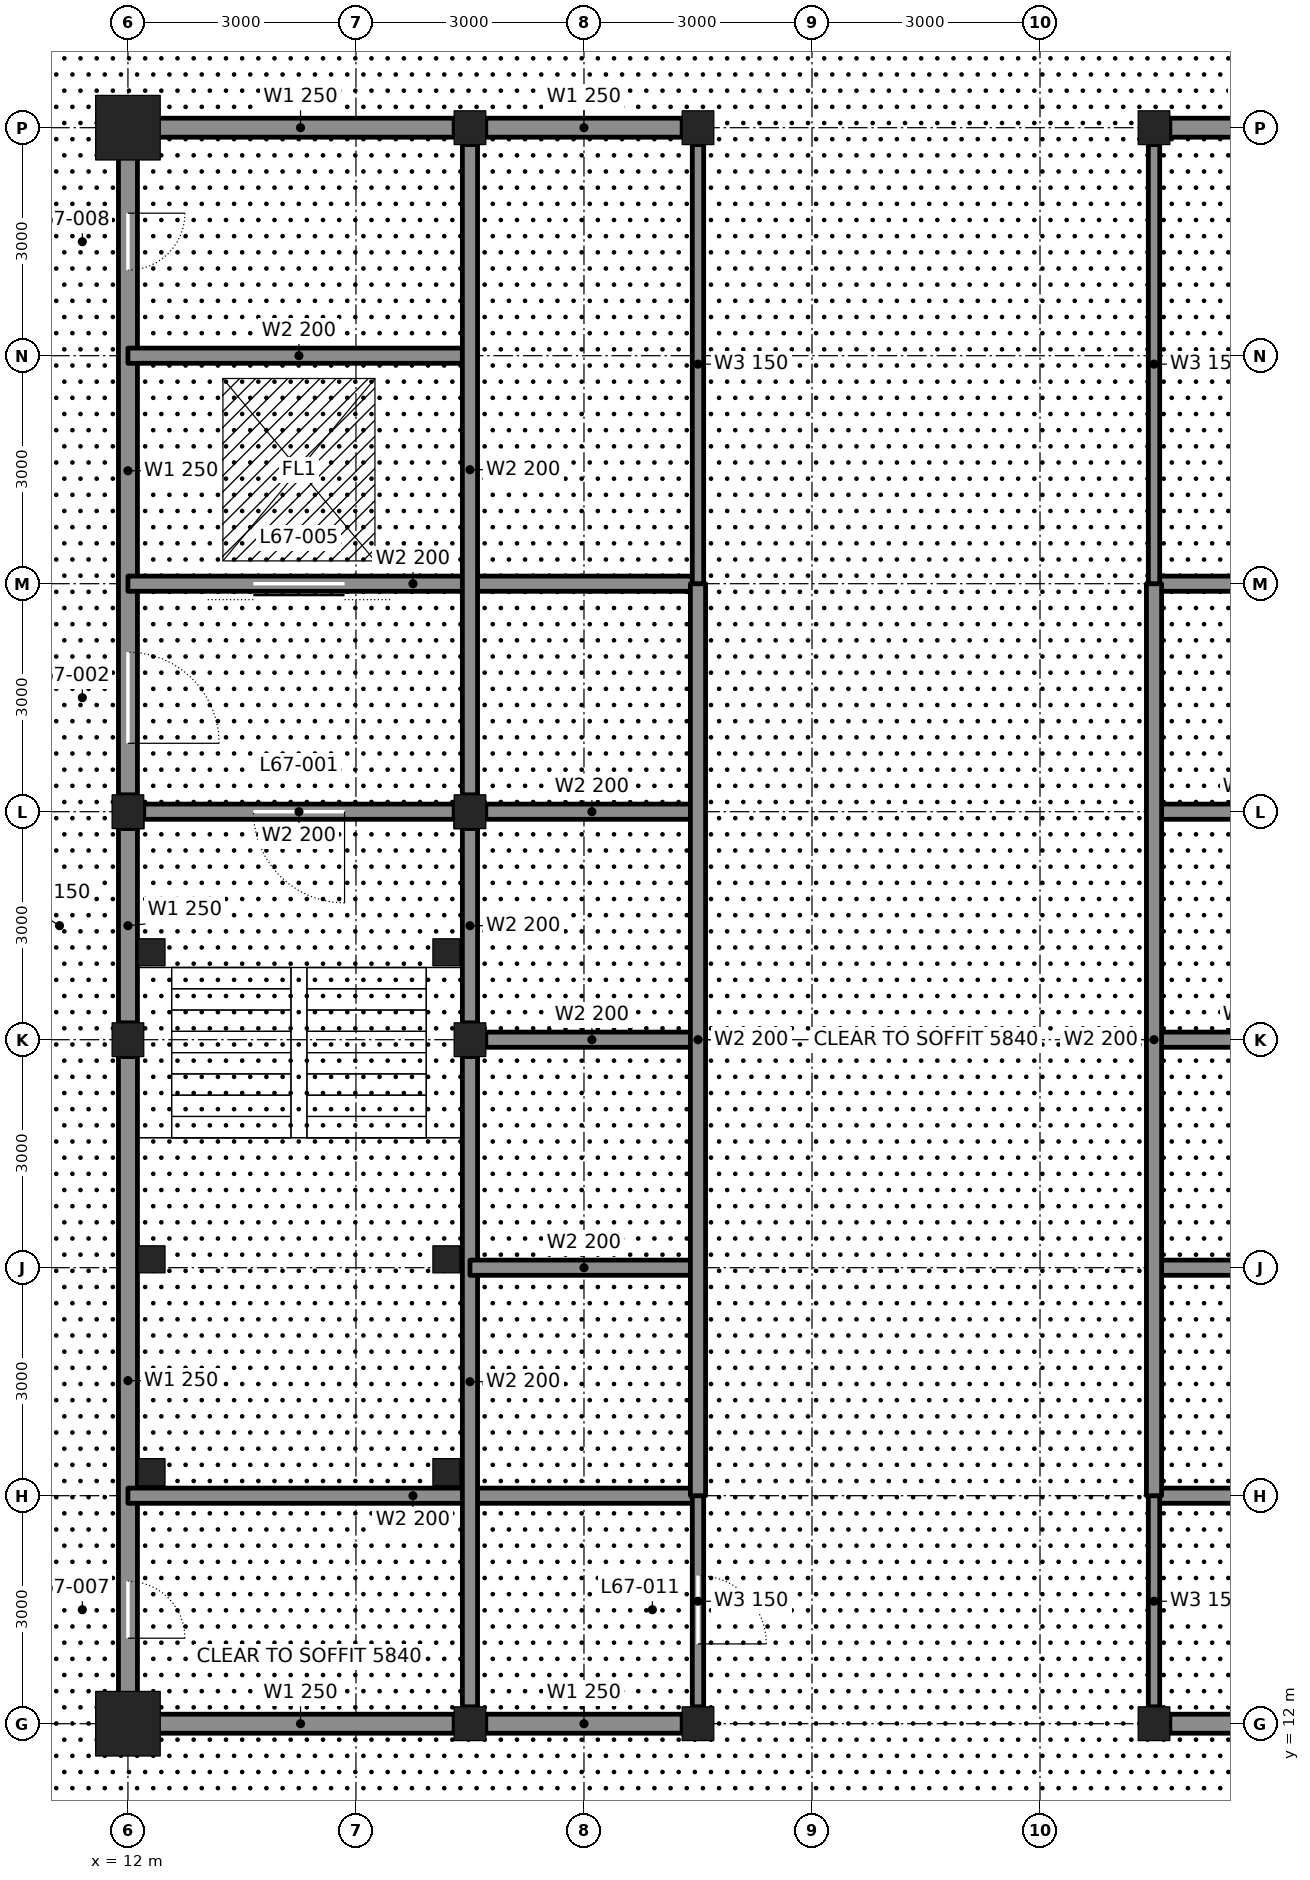
"""IFC4 building model, lengths in metres.
Left out: names, types, materials, properties, quantities, classifications, styles, units other than length and angle.
Written with IfcOpenShell. Run it as: python <this file> out.ifc"""

import sys

from ifc_helpers import new_model, si_unit, direction, frame, frame_2d, origin, origin_2d, place, context, subcontext, project, spatial, rectangle, hollow_rectangle, i_section, extrude, element, fill, save


model = new_model("IFC4")
c1 = context("Model", 3, precision=1e-05, world=origin(), true_north=direction((0.0, 1.0)))
c2 = subcontext(c1, "Body", "Model", "MODEL_VIEW")
j1 = project(units=[si_unit("LENGTHUNIT", "METRE"), si_unit("PLANEANGLEUNIT", "RADIAN")], contexts=[c1])
p1 = place(None, origin())
s1 = spatial("IfcSite", under=j1, at=p1, CompositionType="ELEMENT")
p2 = place(p1, origin())
s2 = spatial("IfcBuilding", under=s1, at=p2, CompositionType="ELEMENT")
p3 = place(p2, frame((0.0, 0.0, 300.0)))
s3 = spatial("IfcBuildingStorey", under=s2, at=p3, CompositionType="ELEMENT", Elevation=300.0)
p4 = place(p3, frame((12.0, 12.0, 0.0), z_axis=(0.0, 0.0, 1.0), x_axis=(1.0, 0.0, 0.0)))
e1 = element("IfcColumn", 1, at=p4, inside=s3, PredefinedType="COLUMN", context=c2, shape_type="SweptSolid", body=[
    extrude(hollow_rectangle(XDim=0.85, YDim=0.85, WallThickness=0.085, at=origin_2d()), origin(), (0.0, 0.0, 1.0), 6.0),
])
for number, where, z_axis, x_axis in (
    (2, (16.5, 12.0, 0.0), (0.0, 0.0, 1.0), (1.0, 0.0, 0.0)),
    (3, (19.5, 12.0, 0.0), (0.0, 0.0, 1.0), (1.0, 0.0, 0.0)),
    (4, (25.5, 12.0, 0.0), (0.0, 0.0, 1.0), (1.0, 0.0, 0.0)),
):
    element("IfcColumn", number, at=place(p3, frame(where, z_axis=z_axis, x_axis=x_axis)), inside=s3, PredefinedType="COLUMN", context=c2, shape_type="SweptSolid", body=[
        extrude(i_section(OverallWidth=0.417, OverallDepth=0.445, WebThickness=0.039, FlangeThickness=0.063, at=origin_2d()), origin(), (0.0, 0.0, 1.0), 6.0),
    ])
p5 = place(p3, frame((12.0, 33.0, 0.0), z_axis=(0.0, 0.0, 1.0), x_axis=(1.0, 0.0, 0.0)))
e5 = element("IfcColumn", 5, at=p5, inside=s3, PredefinedType="COLUMN", context=c2, shape_type="SweptSolid", body=[
    extrude(hollow_rectangle(XDim=0.85, YDim=0.85, WallThickness=0.085, at=origin_2d()), origin(), (0.0, 0.0, 1.0), 6.0),
])
for number, where, z_axis, x_axis in (
    (6, (16.5, 33.0, 0.0), (0.0, 0.0, 1.0), (1.0, 0.0, 0.0)),
    (7, (19.5, 33.0, 0.0), (0.0, 0.0, 1.0), (1.0, 0.0, 0.0)),
    (8, (25.5, 33.0, 0.0), (0.0, 0.0, 1.0), (1.0, 0.0, 0.0)),
    (9, (12.0, 21.0, 0.0), (0.0, 0.0, 1.0), (1.0, 0.0, 0.0)),
    (10, (12.0, 24.0, 0.0), (0.0, 0.0, 1.0), (1.0, 0.0, 0.0)),
    (11, (16.5, 21.0, 0.0), (0.0, 0.0, 1.0), (1.0, 0.0, 0.0)),
    (12, (16.5, 24.0, 0.0), (0.0, 0.0, 1.0), (1.0, 0.0, 0.0)),
):
    element("IfcColumn", number, at=place(p3, frame(where, z_axis=z_axis, x_axis=x_axis)), inside=s3, PredefinedType="COLUMN", context=c2, shape_type="SweptSolid", body=[
        extrude(i_section(OverallWidth=0.417, OverallDepth=0.445, WebThickness=0.039, FlangeThickness=0.063, at=origin_2d()), origin(), (0.0, 0.0, 1.0), 6.0),
    ])
p6 = place(p3, frame((12.0, 12.25, 0.0), z_axis=(0.0, 0.0, 1.0), x_axis=(0.0, 1.0, 0.0)))
e13 = element("IfcWall", 13, at=p6, inside=s3, PredefinedType="SOLIDWALL", context=c2, shape_type="SweptSolid", body=[
    extrude(rectangle(XDim=8.528, YDim=0.25, at=frame_2d((4.264, 0.0))), origin(), (0.0, 0.0, 1.0), 4.913),
])
p7 = place(p6, frame((0.875, 0.0, 0.0)))
e14 = element("IfcOpeningElement", 14, at=p7, cuts=e13, PredefinedType="OPENING", context=c2, shape_type="SweptSolid", body=[
    extrude(rectangle(XDim=0.75, YDim=2.1, at=frame_2d((0.375, 1.05))), frame((0.0, 0.135, 0.0), z_axis=(0.0, -1.0, 0.0), x_axis=(1.0, 0.0, 0.0)), (0.0, 0.0, 1.0), 0.27),
])
p8 = place(p3, frame((12.0, 21.222, 0.0), z_axis=(0.0, 0.0, 1.0), x_axis=(0.0, 1.0, 0.0)))
e15 = element("IfcWall", 15, at=p8, inside=s3, PredefinedType="SOLIDWALL", context=c2, shape_type="SweptSolid", body=[
    extrude(rectangle(XDim=2.555, YDim=0.25, at=frame_2d((1.278, 0.0))), origin(), (0.0, 0.0, 1.0), 4.913),
])
p9 = place(p3, frame((12.0, 24.222, 0.0), z_axis=(0.0, 0.0, 1.0), x_axis=(0.0, 1.0, 0.0)))
e16 = element("IfcWall", 16, at=p9, inside=s3, PredefinedType="SOLIDWALL", context=c2, shape_type="SweptSolid", body=[
    extrude(rectangle(XDim=8.528, YDim=0.25, at=frame_2d((4.264, 0.0))), origin(), (0.0, 0.0, 1.0), 4.913),
])
p10 = place(p9, frame((0.678, 0.0, 0.0)))
e17 = element("IfcOpeningElement", 17, at=p10, cuts=e16, PredefinedType="OPENING", context=c2, shape_type="SweptSolid", body=[
    extrude(rectangle(XDim=1.2, YDim=2.1, at=frame_2d((0.6, 1.05))), frame((0.0, 0.135, 0.0), z_axis=(0.0, -1.0, 0.0), x_axis=(1.0, 0.0, 0.0)), (0.0, 0.0, 1.0), 0.27),
])
p11 = place(p9, frame((6.903, 0.0, 0.0)))
e18 = element("IfcOpeningElement", 18, at=p11, cuts=e16, PredefinedType="OPENING", context=c2, shape_type="SweptSolid", body=[
    extrude(rectangle(XDim=0.75, YDim=2.1, at=frame_2d((0.375, 1.05))), frame((0.0, 0.135, 0.0), z_axis=(0.0, -1.0, 0.0), x_axis=(1.0, 0.0, 0.0)), (0.0, 0.0, 1.0), 0.27),
])
p12 = place(p3, frame((12.25, 12.0, 0.0), z_axis=(0.0, 0.0, 1.0), x_axis=(1.0, 0.0, 0.0)))
e19 = element("IfcWall", 19, at=p12, inside=s3, PredefinedType="SOLIDWALL", context=c2, shape_type="SweptSolid", body=[
    extrude(rectangle(XDim=4.042, YDim=0.25, at=frame_2d((2.021, 0.0))), origin(), (0.0, 0.0, 1.0), 4.981),
])
for number, where, z_axis, x_axis in (
    (20, (16.708, 12.0, 0.0), (0.0, 0.0, 1.0), (1.0, 0.0, 0.0)),
    (21, (25.708, 12.0, 0.0), (0.0, 0.0, 1.0), (1.0, 0.0, 0.0)),
):
    element("IfcWall", number, at=place(p3, frame(where, z_axis=z_axis, x_axis=x_axis)), inside=s3, PredefinedType="SOLIDWALL", context=c2, shape_type="SweptSolid", body=[
        extrude(rectangle(XDim=2.583, YDim=0.25, at=frame_2d((1.292, 0.0))), origin(), (0.0, 0.0, 1.0), 4.981),
    ])
for number, where, z_axis, x_axis in (
    (22, (12.0, 15.0, 0.0), (0.0, 0.0, 1.0), (1.0, 0.0, 0.0)),
    (23, (25.5, 15.0, 0.0), (0.0, 0.0, 1.0), (1.0, 0.0, 0.0)),
):
    element("IfcWall", number, at=place(p3, frame(where, z_axis=z_axis, x_axis=x_axis)), inside=s3, PredefinedType="SOLIDWALL", context=c2, shape_type="SweptSolid", body=[
        extrude(rectangle(XDim=7.5, YDim=0.2, at=frame_2d((3.75, 0.0))), origin(), (0.0, 0.0, 1.0), 5.84),
    ])
p13 = place(p3, frame((12.208, 24.0, 0.0), z_axis=(0.0, 0.0, 1.0), x_axis=(1.0, 0.0, 0.0)))
e24 = element("IfcWall", 24, at=p13, inside=s3, PredefinedType="SOLIDWALL", context=c2, shape_type="SweptSolid", body=[
    extrude(rectangle(XDim=4.083, YDim=0.2, at=frame_2d((2.042, 0.0))), origin(), (0.0, 0.0, 1.0), 4.89),
])
p14 = place(p13, frame((1.442, 0.0, 0.0)))
e25 = element("IfcOpeningElement", 25, at=p14, cuts=e24, PredefinedType="OPENING", context=c2, shape_type="SweptSolid", body=[
    extrude(rectangle(XDim=1.2, YDim=2.1, at=frame_2d((0.6, 1.05))), frame((0.0, 0.11, 0.0), z_axis=(0.0, -1.0, 0.0), x_axis=(1.0, 0.0, 0.0)), (0.0, 0.0, 1.0), 0.22),
])
for number, where, z_axis, x_axis in (
    (26, (16.708, 24.0, 0.0), (0.0, 0.0, 1.0), (1.0, 0.0, 0.0)),
    (27, (25.5, 24.0, 0.0), (0.0, 0.0, 1.0), (1.0, 0.0, 0.0)),
):
    element("IfcWall", number, at=place(p3, frame(where, z_axis=z_axis, x_axis=x_axis)), inside=s3, PredefinedType="SOLIDWALL", context=c2, shape_type="SweptSolid", body=[
        extrude(rectangle(XDim=2.792, YDim=0.2, at=frame_2d((1.396, 0.0))), origin(), (0.0, 0.0, 1.0), 4.89),
    ])
p15 = place(p3, frame((12.0, 27.0, 0.0), z_axis=(0.0, 0.0, 1.0), x_axis=(1.0, 0.0, 0.0)))
e28 = element("IfcWall", 28, at=p15, inside=s3, PredefinedType="SOLIDWALL", context=c2, shape_type="SweptSolid", body=[
    extrude(rectangle(XDim=7.5, YDim=0.2, at=frame_2d((3.75, 0.0))), origin(), (0.0, 0.0, 1.0), 5.84),
])
p16 = place(p15, frame((1.65, 0.0, 0.0)))
e29 = element("IfcOpeningElement", 29, at=p16, cuts=e28, PredefinedType="OPENING", context=c2, shape_type="SweptSolid", body=[
    extrude(rectangle(XDim=1.2, YDim=2.1, at=frame_2d((0.6, 1.05))), frame((0.0, 0.11, 0.0), z_axis=(0.0, -1.0, 0.0), x_axis=(1.0, 0.0, 0.0)), (0.0, 0.0, 1.0), 0.22),
])
p17 = place(p3, frame((25.5, 27.0, 0.0), z_axis=(0.0, 0.0, 1.0), x_axis=(1.0, 0.0, 0.0)))
e30 = element("IfcWall", 30, at=p17, inside=s3, PredefinedType="SOLIDWALL", context=c2, shape_type="SweptSolid", body=[
    extrude(rectangle(XDim=3.0, YDim=0.2, at=frame_2d((1.5, 0.0))), origin(), (0.0, 0.0, 1.0), 5.84),
])
p18 = place(p3, frame((12.0, 30.0, 0.0), z_axis=(0.0, 0.0, 1.0), x_axis=(1.0, 0.0, 0.0)))
e31 = element("IfcWall", 31, at=p18, inside=s3, PredefinedType="SOLIDWALL", context=c2, shape_type="SweptSolid", body=[
    extrude(rectangle(XDim=4.5, YDim=0.2, at=frame_2d((2.25, 0.0))), origin(), (0.0, 0.0, 1.0), 5.84),
])
p19 = place(p3, frame((12.25, 33.0, 0.0), z_axis=(0.0, 0.0, 1.0), x_axis=(1.0, 0.0, 0.0)))
e32 = element("IfcWall", 32, at=p19, inside=s3, PredefinedType="SOLIDWALL", context=c2, shape_type="SweptSolid", body=[
    extrude(rectangle(XDim=4.042, YDim=0.25, at=frame_2d((2.021, 0.0))), origin(), (0.0, 0.0, 1.0), 4.981),
])
for number, where, z_axis, x_axis in (
    (33, (16.708, 33.0, 0.0), (0.0, 0.0, 1.0), (1.0, 0.0, 0.0)),
    (34, (25.708, 33.0, 0.0), (0.0, 0.0, 1.0), (1.0, 0.0, 0.0)),
):
    element("IfcWall", number, at=place(p3, frame(where, z_axis=z_axis, x_axis=x_axis)), inside=s3, PredefinedType="SOLIDWALL", context=c2, shape_type="SweptSolid", body=[
        extrude(rectangle(XDim=2.583, YDim=0.25, at=frame_2d((1.292, 0.0))), origin(), (0.0, 0.0, 1.0), 4.981),
    ])
p20 = place(p3, frame((16.5, 12.222, 0.0), z_axis=(0.0, 0.0, 1.0), x_axis=(0.0, 1.0, 0.0)))
e35 = element("IfcWall", 35, at=p20, inside=s3, PredefinedType="SOLIDWALL", context=c2, shape_type="SweptSolid", body=[
    extrude(rectangle(XDim=8.555, YDim=0.2, at=frame_2d((4.278, 0.0))), origin(), (0.0, 0.0, 1.0), 4.913),
])
p21 = place(p3, frame((16.5, 21.222, 0.0), z_axis=(0.0, 0.0, 1.0), x_axis=(0.0, 1.0, 0.0)))
e36 = element("IfcWall", 36, at=p21, inside=s3, PredefinedType="SOLIDWALL", context=c2, shape_type="SweptSolid", body=[
    extrude(rectangle(XDim=2.555, YDim=0.2, at=frame_2d((1.278, 0.0))), origin(), (0.0, 0.0, 1.0), 4.913),
])
p22 = place(p3, frame((16.5, 24.222, 0.0), z_axis=(0.0, 0.0, 1.0), x_axis=(0.0, 1.0, 0.0)))
e37 = element("IfcWall", 37, at=p22, inside=s3, PredefinedType="SOLIDWALL", context=c2, shape_type="SweptSolid", body=[
    extrude(rectangle(XDim=8.555, YDim=0.2, at=frame_2d((4.278, 0.0))), origin(), (0.0, 0.0, 1.0), 4.913),
])
p23 = place(p3, frame((16.5, 18.0, 0.0), z_axis=(0.0, 0.0, 1.0), x_axis=(1.0, 0.0, 0.0)))
e38 = element("IfcWall", 38, at=p23, inside=s3, PredefinedType="SOLIDWALL", context=c2, shape_type="SweptSolid", body=[
    extrude(rectangle(XDim=3.0, YDim=0.2, at=frame_2d((1.5, 0.0))), origin(), (0.0, 0.0, 1.0), 5.84),
])
p24 = place(p3, frame((25.5, 18.0, 0.0), z_axis=(0.0, 0.0, 1.0), x_axis=(1.0, 0.0, 0.0)))
e39 = element("IfcWall", 39, at=p24, inside=s3, PredefinedType="SOLIDWALL", context=c2, shape_type="SweptSolid", body=[
    extrude(rectangle(XDim=7.5, YDim=0.2, at=frame_2d((3.75, 0.0))), origin(), (0.0, 0.0, 1.0), 5.84),
])
p25 = place(p24, frame((4.65, 0.0, 0.0)))
e40 = element("IfcOpeningElement", 40, at=p25, cuts=e39, PredefinedType="OPENING", context=c2, shape_type="SweptSolid", body=[
    extrude(rectangle(XDim=1.2, YDim=2.1, at=frame_2d((0.6, 1.05))), frame((0.0, 0.11, 0.0), z_axis=(0.0, -1.0, 0.0), x_axis=(1.0, 0.0, 0.0)), (0.0, 0.0, 1.0), 0.22),
])
for number, where, z_axis, x_axis in (
    (41, (16.708, 21.0, 0.0), (0.0, 0.0, 1.0), (1.0, 0.0, 0.0)),
    (42, (25.5, 21.0, 0.0), (0.0, 0.0, 1.0), (1.0, 0.0, 0.0)),
):
    element("IfcWall", number, at=place(p3, frame(where, z_axis=z_axis, x_axis=x_axis)), inside=s3, PredefinedType="SOLIDWALL", context=c2, shape_type="SweptSolid", body=[
        extrude(rectangle(XDim=2.792, YDim=0.2, at=frame_2d((1.396, 0.0))), origin(), (0.0, 0.0, 1.0), 4.89),
    ])
p26 = place(p3, frame((19.5, 12.222, 0.0), z_axis=(0.0, 0.0, 1.0), x_axis=(0.0, 1.0, 0.0)))
e43 = element("IfcWall", 43, at=p26, inside=s3, PredefinedType="PARTITIONING", context=c2, shape_type="SweptSolid", body=[
    extrude(rectangle(XDim=2.778, YDim=0.15, at=frame_2d((1.389, 0.0))), origin(), (0.0, 0.0, 1.0), 4.865),
])
p27 = place(p26, frame((0.828, 0.0, 0.0)))
e44 = element("IfcOpeningElement", 44, at=p27, cuts=e43, PredefinedType="OPENING", context=c2, shape_type="SweptSolid", body=[
    extrude(rectangle(XDim=0.9, YDim=2.1, at=frame_2d((0.45, 1.05))), frame((0.0, 0.085, 0.0), z_axis=(0.0, -1.0, 0.0), x_axis=(1.0, 0.0, 0.0)), (0.0, 0.0, 1.0), 0.17),
])
p28 = place(p3, frame((19.5, 15.0, 0.0), z_axis=(0.0, 0.0, 1.0), x_axis=(0.0, 1.0, 0.0)))
e45 = element("IfcWall", 45, at=p28, inside=s3, PredefinedType="SOLIDWALL", context=c2, shape_type="SweptSolid", body=[
    extrude(rectangle(XDim=12.0, YDim=0.2, at=frame_2d((6.0, 0.0))), origin(), (0.0, 0.0, 1.0), 4.865),
])
p29 = place(p3, frame((19.5, 27.0, 0.0), z_axis=(0.0, 0.0, 1.0), x_axis=(0.0, 1.0, 0.0)))
e46 = element("IfcWall", 46, at=p29, inside=s3, PredefinedType="PARTITIONING", context=c2, shape_type="SweptSolid", body=[
    extrude(rectangle(XDim=5.778, YDim=0.15, at=frame_2d((2.889, 0.0))), origin(), (0.0, 0.0, 1.0), 4.865),
])
p30 = place(p3, frame((25.5, 12.222, 0.0), z_axis=(0.0, 0.0, 1.0), x_axis=(0.0, 1.0, 0.0)))
e47 = element("IfcWall", 47, at=p30, inside=s3, PredefinedType="PARTITIONING", context=c2, shape_type="SweptSolid", body=[
    extrude(rectangle(XDim=2.778, YDim=0.15, at=frame_2d((1.389, 0.0))), origin(), (0.0, 0.0, 1.0), 4.865),
])
p31 = place(p3, frame((25.5, 15.0, 0.0), z_axis=(0.0, 0.0, 1.0), x_axis=(0.0, 1.0, 0.0)))
e48 = element("IfcWall", 48, at=p31, inside=s3, PredefinedType="SOLIDWALL", context=c2, shape_type="SweptSolid", body=[
    extrude(rectangle(XDim=12.0, YDim=0.2, at=frame_2d((6.0, 0.0))), origin(), (0.0, 0.0, 1.0), 4.865),
])
p32 = place(p3, frame((25.5, 27.0, 0.0), z_axis=(0.0, 0.0, 1.0), x_axis=(0.0, 1.0, 0.0)))
e49 = element("IfcWall", 49, at=p32, inside=s3, PredefinedType="PARTITIONING", context=c2, shape_type="SweptSolid", body=[
    extrude(rectangle(XDim=5.778, YDim=0.15, at=frame_2d((2.889, 0.0))), origin(), (0.0, 0.0, 1.0), 4.865),
])
for number, where, z_axis, x_axis in (
    (50, (12.31, 15.31, 0.0), (0.0, 0.0, 1.0), (1.0, 0.0, 0.0)),
    (51, (16.19, 15.31, 0.0), (0.0, 0.0, 1.0), (1.0, 0.0, 0.0)),
    (52, (12.31, 18.11, 0.0), (0.0, 0.0, 1.0), (1.0, 0.0, 0.0)),
    (53, (16.19, 18.11, 0.0), (0.0, 0.0, 1.0), (1.0, 0.0, 0.0)),
    (54, (12.31, 22.15, 0.0), (0.0, 0.0, 1.0), (1.0, 0.0, 0.0)),
    (55, (16.19, 22.15, 0.0), (0.0, 0.0, 1.0), (1.0, 0.0, 0.0)),
):
    element("IfcColumn", number, at=place(p3, frame(where, z_axis=z_axis, x_axis=x_axis)), inside=s3, PredefinedType="COLUMN", context=c2, shape_type="SweptSolid", body=[
        extrude(hollow_rectangle(XDim=0.356, YDim=0.356, WallThickness=0.009, at=origin_2d()), origin(), (0.0, 0.0, 1.0), 6.0),
    ])
p33 = place(p14, frame((1.2, 0.0, 0.0), z_axis=(0.0, 0.0, 1.0), x_axis=(-1.0, 0.0, 0.0)))
e56 = element("IfcDoor", 56, at=p33, inside=s3, OperationType="SINGLE_SWING_LEFT", PredefinedType="DOOR", context=c2, shape_type="SweptSolid", body=[
    extrude(rectangle(XDim=1.2, YDim=2.1, at=frame_2d((0.6, 1.05))), frame((0.0, 0.025, 0.0), z_axis=(0.0, -1.0, 0.0), x_axis=(1.0, 0.0, 0.0)), (0.0, 0.0, 1.0), 0.05),
])
fill(e25, e56)
p34 = place(p10, frame((1.2, 0.0, 0.0), z_axis=(0.0, 0.0, 1.0), x_axis=(-1.0, 0.0, 0.0)))
e57 = element("IfcDoor", 57, at=p34, inside=s3, OperationType="SINGLE_SWING_RIGHT", PredefinedType="DOOR", context=c2, shape_type="SweptSolid", body=[
    extrude(rectangle(XDim=1.2, YDim=2.1, at=frame_2d((0.6, 1.05))), frame((0.0, 0.025, 0.0), z_axis=(0.0, -1.0, 0.0), x_axis=(1.0, 0.0, 0.0)), (0.0, 0.0, 1.0), 0.05),
])
fill(e17, e57)
p35 = place(p16, origin())
e58 = element("IfcDoor", 58, at=p35, inside=s3, OperationType="DOUBLE_DOOR_SLIDING", PredefinedType="DOOR", context=c2, shape_type="SweptSolid", body=[
    extrude(rectangle(XDim=1.2, YDim=2.1, at=frame_2d((0.6, 1.05))), frame((0.0, 0.025, 0.0), z_axis=(0.0, -1.0, 0.0), x_axis=(1.0, 0.0, 0.0)), (0.0, 0.0, 1.0), 0.05),
])
fill(e29, e58)
p36 = place(p7, frame((0.75, 0.0, 0.0), z_axis=(0.0, 0.0, 1.0), x_axis=(-1.0, 0.0, 0.0)))
e59 = element("IfcDoor", 59, at=p36, inside=s3, OperationType="SINGLE_SWING_RIGHT", PredefinedType="DOOR", context=c2, shape_type="SweptSolid", body=[
    extrude(rectangle(XDim=0.75, YDim=2.1, at=frame_2d((0.375, 1.05))), frame((0.0, 0.025, 0.0), z_axis=(0.0, -1.0, 0.0), x_axis=(1.0, 0.0, 0.0)), (0.0, 0.0, 1.0), 0.05),
])
fill(e14, e59)
p37 = place(p11, frame((0.75, 0.0, 0.0), z_axis=(0.0, 0.0, 1.0), x_axis=(-1.0, 0.0, 0.0)))
e60 = element("IfcDoor", 60, at=p37, inside=s3, OperationType="SINGLE_SWING_LEFT", PredefinedType="DOOR", context=c2, shape_type="SweptSolid", body=[
    extrude(rectangle(XDim=0.75, YDim=2.1, at=frame_2d((0.375, 1.05))), frame((0.0, 0.025, 0.0), z_axis=(0.0, -1.0, 0.0), x_axis=(1.0, 0.0, 0.0)), (0.0, 0.0, 1.0), 0.05),
])
fill(e18, e60)
p38 = place(p27, frame((0.9, 0.0, 0.0), z_axis=(0.0, 0.0, 1.0), x_axis=(-1.0, 0.0, 0.0)))
e61 = element("IfcDoor", 61, at=p38, inside=s3, OperationType="SINGLE_SWING_RIGHT", PredefinedType="DOOR", context=c2, shape_type="SweptSolid", body=[
    extrude(rectangle(XDim=0.9, YDim=2.1, at=frame_2d((0.45, 1.05))), frame((0.0, 0.025, 0.0), z_axis=(0.0, -1.0, 0.0), x_axis=(1.0, 0.0, 0.0)), (0.0, 0.0, 1.0), 0.05),
])
fill(e44, e61)
save(model, sys.argv[1])
